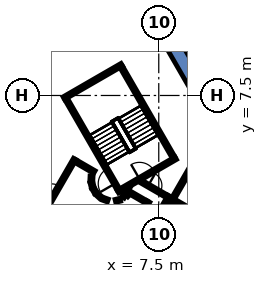
"""IFC4 building model, lengths in metres.
Left out: names, types, materials, properties, quantities, classifications, styles, units other than length and angle.
Written with IfcOpenShell. Run it as: python <this file> out.ifc"""

import sys

from ifc_helpers import new_model, si_unit, direction, frame, frame_2d, origin, place, context, subcontext, project, spatial, polyline, rectangle, outline, extrude, element, fill, save


model = new_model("IFC4")
c1 = context("Model", 3, precision=1e-05, world=origin(), true_north=direction((0.0, 1.0)))
c2 = subcontext(c1, "Body", "Model", "MODEL_VIEW")
j1 = project(units=[si_unit("LENGTHUNIT", "METRE"), si_unit("PLANEANGLEUNIT", "RADIAN")], contexts=[c1])
p1 = place(None, origin())
s1 = spatial("IfcSite", under=j1, at=p1, CompositionType="ELEMENT")
p2 = place(p1, origin())
s2 = spatial("IfcBuilding", under=s1, at=p2, CompositionType="ELEMENT")
p3 = place(p2, origin())
s3 = spatial("IfcBuildingStorey", under=s2, at=p3, CompositionType="ELEMENT", Elevation=0.0)
p4 = place(p3, frame((0.0, 0.0, -0.5)))
e1 = element("IfcWall", 1, at=p4, inside=s3, PredefinedType="SHEAR", context=c2, shape_type="SweptSolid", body=[
    extrude(outline(polyline([(8.517, 11.748), (7.651, 11.248), (12.702, 2.5), (13.856, 2.5), (8.517, 11.748)])), origin(), (0.0, 0.0, 1.0), 9.05),
])
p5 = place(p3, frame((5.39, 0.898, 0.0), z_axis=(0.0, 0.0, 1.0), x_axis=(0.673828488714, 0.738887791073, 0.0)))
e2 = element("IfcWall", 2, at=p5, inside=s3, PredefinedType="PARTITIONING", context=c2, shape_type="SweptSolid", body=[
    extrude(rectangle(XDim=0.263, YDim=0.2, at=frame_2d((0.131, 0.0))), origin(), (0.0, 0.0, 1.0), 8.55),
])
p6 = place(p3, frame((5.499, 1.172, 0.0), z_axis=(0.0, 0.0, 1.0), x_axis=(0.866333505267, -0.499465972466, 0.0)))
e3 = element("IfcWall", 3, at=p6, inside=s3, PredefinedType="PARTITIONING", context=c2, shape_type="SweptSolid", body=[
    extrude(rectangle(XDim=1.374, YDim=0.2, at=frame_2d((0.687, 0.0))), origin(), (0.0, 0.0, 1.0), 8.55),
])
p7 = place(p3, frame((6.826, 0.522, 0.0), z_axis=(0.0, 0.0, 1.0), x_axis=(-0.500016722714, -0.866015748706, 0.0)))
e4 = element("IfcWall", 4, at=p7, inside=s3, PredefinedType="PARTITIONING", context=c2, shape_type="SweptSolid", body=[
    extrude(rectangle(XDim=1.7, YDim=0.2, at=frame_2d((0.85, 0.0))), origin(), (0.0, 0.0, 1.0), 8.55),
])
p8 = place(p3, frame((8.192, 0.888, 0.0), z_axis=(0.0, 0.0, 1.0), x_axis=(-0.499940625693, -0.866059680843, 0.0)))
e5 = element("IfcWall", 5, at=p8, inside=s3, PredefinedType="PARTITIONING", context=c2, shape_type="SweptSolid", body=[
    extrude(rectangle(XDim=2.68, YDim=0.2, at=frame_2d((1.34, 0.0))), origin(), (0.0, 0.0, 1.0), 8.55),
])
p9 = place(p3, frame((5.135, 0.793, 0.0), z_axis=(0.0, 0.0, 1.0), x_axis=(0.499526442893, 0.866298639529, 0.0)))
e6 = element("IfcWall", 6, at=p9, inside=s3, PredefinedType="PARTITIONING", context=c2, shape_type="SweptSolid", body=[
    extrude(rectangle(XDim=0.791, YDim=0.2, at=frame_2d((0.396, 0.0))), origin(), (0.0, 0.0, 1.0), 8.55),
])
p10 = place(p3, frame((6.25, 1.894, 0.0), z_axis=(0.0, 0.0, 1.0), x_axis=(0.866043184279, -0.499969202016, 0.0)))
e7 = element("IfcWall", 7, at=p10, inside=s3, PredefinedType="PARTITIONING", context=c2, shape_type="SweptSolid", body=[
    extrude(rectangle(XDim=2.084, YDim=0.2, at=frame_2d((1.042, 0.0))), origin(), (0.0, 0.0, 1.0), 8.55),
])
p11 = place(p10, frame((0.642, 0.0, 0.0)))
e8 = element("IfcOpeningElement", 8, at=p11, cuts=e7, PredefinedType="OPENING", context=c2, shape_type="SweptSolid", body=[
    extrude(rectangle(XDim=0.9, YDim=2.1, at=frame_2d((0.45, 1.05))), frame((0.0, 0.11, 0.0), z_axis=(0.0, -1.0, 0.0), x_axis=(1.0, 0.0, 0.0)), (0.0, 0.0, 1.0), 0.22),
])
p12 = place(p3, frame((3.079, 2.199, 0.0), z_axis=(0.0, 0.0, 1.0), x_axis=(-0.047771483479, -0.998858290933, 0.0)))
e9 = element("IfcWall", 9, at=p12, inside=s3, PredefinedType="PARTITIONING", context=c2, shape_type="SweptSolid", body=[
    extrude(rectangle(XDim=0.337, YDim=0.2, at=frame_2d((0.169, 0.0))), origin(), (0.0, 0.0, 1.0), 8.55),
])
p13 = place(p3, frame((3.07, 1.786, 0.0), z_axis=(0.0, 0.0, 1.0), x_axis=(0.242705583207, -0.970099994784, 0.0)))
e10 = element("IfcWall", 10, at=p13, inside=s3, PredefinedType="PARTITIONING", context=c2, shape_type="SweptSolid", body=[
    extrude(rectangle(XDim=0.338, YDim=0.2, at=frame_2d((0.169, 0.0))), origin(), (0.0, 0.0, 1.0), 8.55),
])
for number, where, z_axis, x_axis in (
    (11, (3.182, 1.388, 0.0), (0.0, 0.0, 1.0), (0.512, -0.859, 0.0)),
    (12, (3.404, 1.039, 0.0), (0.0, 0.0, 1.0), (0.74, -0.672, 0.0)),
):
    element("IfcWall", number, at=place(p3, frame(where, z_axis=z_axis, x_axis=x_axis)), inside=s3, PredefinedType="PARTITIONING", context=c2, shape_type="SweptSolid", body=[
        extrude(rectangle(XDim=0.338, YDim=0.2, at=frame_2d((0.169, 0.0))), origin(), (0.0, 0.0, 1.0), 8.55),
    ])
p14 = place(p3, frame((3.838, 0.702, 0.0), z_axis=(0.0, 0.0, 1.0), x_axis=(0.941035081519, -0.338308993895, 0.0)))
e13 = element("IfcWall", 13, at=p14, inside=s3, PredefinedType="PARTITIONING", context=c2, shape_type="SweptSolid", body=[
    extrude(rectangle(XDim=0.337, YDim=0.2, at=frame_2d((0.168, 0.0))), origin(), (0.0, 0.0, 1.0), 8.55),
])
p15 = place(p3, frame((4.644, 0.564, 0.0), z_axis=(0.0, 0.0, 1.0), x_axis=(0.969929076366, 0.243387729394, 0.0)))
e14 = element("IfcWall", 14, at=p15, inside=s3, PredefinedType="PARTITIONING", context=c2, shape_type="SweptSolid", body=[
    extrude(rectangle(XDim=0.337, YDim=0.2, at=frame_2d((0.168, 0.0))), origin(), (0.0, 0.0, 1.0), 8.55),
])
p16 = place(p3, frame((-0.52, -1.0, 0.0), z_axis=(0.0, 0.0, 1.0), x_axis=(0.50011622646, 0.865958290007, 0.0)))
e15 = element("IfcWall", 15, at=p16, inside=s3, PredefinedType="PARTITIONING", context=c2, shape_type="SweptSolid", body=[
    extrude(rectangle(XDim=4.991, YDim=0.2, at=frame_2d((2.496, 0.0))), origin(), (0.0, 0.0, 1.0), 8.55),
])
p17 = place(p16, frame((1.945, 0.0, 0.0)))
e16 = element("IfcOpeningElement", 16, at=p17, cuts=e15, PredefinedType="OPENING", context=c2, shape_type="SweptSolid", body=[
    extrude(rectangle(XDim=1.0, YDim=2.1, at=frame_2d((0.5, 1.05))), frame((0.0, 0.11, 0.0), z_axis=(0.0, -1.0, 0.0), x_axis=(1.0, 0.0, 0.0)), (0.0, 0.0, 1.0), 0.22),
])
p18 = place(p3, frame((2.012, 3.186, 0.0), z_axis=(0.0, 0.0, 1.0), x_axis=(0.865891012941, -0.500232699559, 0.0)))
e17 = element("IfcWall", 17, at=p18, inside=s3, PredefinedType="PARTITIONING", context=c2, shape_type="SweptSolid", body=[
    extrude(rectangle(XDim=1.449, YDim=0.2, at=frame_2d((0.725, 0.0))), origin(), (0.0, 0.0, 1.0), 8.55),
])
p19 = place(p3, frame((4.451, -6.19, 0.0), z_axis=(0.0, 0.0, 1.0), x_axis=(0.50000090737, 0.866024879913, 0.0)))
e18 = element("IfcWall", 18, at=p19, inside=s3, PredefinedType="STANDARD", context=c2, shape_type="SweptSolid", body=[
    extrude(rectangle(XDim=10.6, YDim=0.2, at=frame_2d((5.3, 0.0))), origin(), (0.0, 0.0, 1.0), 8.55),
])
p20 = place(p3, frame((8.488, 0.602, 0.0), z_axis=(0.0, 0.0, 1.0), x_axis=(0.866022959057, -0.500004234368, 0.0)))
e19 = element("IfcWall", 19, at=p20, inside=s3, PredefinedType="STANDARD", context=c2, shape_type="SweptSolid", body=[
    extrude(rectangle(XDim=2.5, YDim=0.2, at=frame_2d((1.25, 0.0))), origin(), (0.0, 0.0, 1.0), 8.55),
])
p21 = place(p3, frame((4.806, 1.176, 0.0), z_axis=(0.0, 0.0, 1.0), x_axis=(0.866059941101, 0.499940174841, 0.0)))
e20 = element("IfcWall", 20, at=p21, inside=s3, PredefinedType="STANDARD", context=c2, shape_type="SweptSolid", body=[
    extrude(rectangle(XDim=4.4, YDim=0.2, at=frame_2d((2.2, 0.0))), origin(), (0.0, 0.0, 1.0), 8.55),
])
p22 = place(p21, frame((1.65, 0.0, 0.0)))
e21 = element("IfcOpeningElement", 21, at=p22, cuts=e20, PredefinedType="OPENING", context=c2, shape_type="SweptSolid", body=[
    extrude(rectangle(XDim=1.1, YDim=2.2, at=frame_2d((0.55, 1.1))), frame((0.0, 0.11, 0.0), z_axis=(0.0, -1.0, 0.0), x_axis=(1.0, 0.0, 0.0)), (0.0, 0.0, 1.0), 0.22),
])
p23 = place(p3, frame((1.256, 7.324, 0.0), z_axis=(0.0, 0.0, 1.0), x_axis=(0.866046073146, 0.499964197906, 0.0)))
e22 = element("IfcWall", 22, at=p23, inside=s3, PredefinedType="STANDARD", context=c2, shape_type="SweptSolid", body=[
    extrude(rectangle(XDim=4.4, YDim=0.2, at=frame_2d((2.2, 0.0))), origin(), (0.0, 0.0, 1.0), 8.55),
])
p24 = place(p3, frame((4.843, 1.312, 0.0), z_axis=(0.0, 0.0, 1.0), x_axis=(-0.499963383562, 0.866046543262, 0.0)))
e23 = element("IfcWall", 23, at=p24, inside=s3, PredefinedType="STANDARD", context=c2, shape_type="SweptSolid", body=[
    extrude(rectangle(XDim=6.9, YDim=0.2, at=frame_2d((3.45, 0.0))), origin(), (0.0, 0.0, 1.0), 8.55),
])
p25 = place(p24, frame((0.45, 0.0, 0.0)))
e24 = element("IfcOpeningElement", 24, at=p25, cuts=e23, PredefinedType="OPENING", context=c2, shape_type="SweptSolid", body=[
    extrude(rectangle(XDim=1.1, YDim=2.2, at=frame_2d((0.55, 1.1))), frame((0.0, 0.11, 0.0), z_axis=(0.0, -1.0, 0.0), x_axis=(1.0, 0.0, 0.0)), (0.0, 0.0, 1.0), 0.22),
])
p26 = place(p3, frame((8.48, 3.412, 0.0), z_axis=(0.0, 0.0, 1.0), x_axis=(-0.499978703459, 0.866037698999, 0.0)))
e25 = element("IfcWall", 25, at=p26, inside=s3, PredefinedType="STANDARD", context=c2, shape_type="SweptSolid", body=[
    extrude(rectangle(XDim=6.9, YDim=0.2, at=frame_2d((3.45, 0.0))), origin(), (0.0, 0.0, 1.0), 8.55),
])
p27 = place(p17, origin())
e26 = element("IfcDoor", 26, at=p27, inside=s3, OperationType="SINGLE_SWING_LEFT", PredefinedType="DOOR", context=c2, shape_type="SweptSolid", body=[
    extrude(rectangle(XDim=1.0, YDim=2.1, at=frame_2d((0.5, 1.05))), frame((0.0, 0.025, 0.0), z_axis=(0.0, -1.0, 0.0), x_axis=(1.0, 0.0, 0.0)), (0.0, 0.0, 1.0), 0.05),
])
fill(e16, e26)
p28 = place(p11, origin())
e27 = element("IfcDoor", 27, at=p28, inside=s3, OperationType="SINGLE_SWING_LEFT", PredefinedType="DOOR", context=c2, shape_type="SweptSolid", body=[
    extrude(rectangle(XDim=0.9, YDim=2.1, at=frame_2d((0.45, 1.05))), frame((0.0, 0.025, 0.0), z_axis=(0.0, -1.0, 0.0), x_axis=(1.0, 0.0, 0.0)), (0.0, 0.0, 1.0), 0.05),
])
fill(e8, e27)
p29 = place(p25, origin())
e28 = element("IfcDoor", 28, at=p29, inside=s3, OperationType="SINGLE_SWING_LEFT", PredefinedType="DOOR", context=c2, shape_type="SweptSolid", body=[
    extrude(rectangle(XDim=1.1, YDim=2.2, at=frame_2d((0.55, 1.1))), frame((0.0, 0.025, 0.0), z_axis=(0.0, -1.0, 0.0), x_axis=(1.0, 0.0, 0.0)), (0.0, 0.0, 1.0), 0.05),
])
fill(e24, e28)
p30 = place(p22, origin())
e29 = element("IfcDoor", 29, at=p30, inside=s3, OperationType="SINGLE_SWING_LEFT", PredefinedType="DOOR", context=c2, shape_type="SweptSolid", body=[
    extrude(rectangle(XDim=1.1, YDim=2.2, at=frame_2d((0.55, 1.1))), frame((0.0, 0.025, 0.0), z_axis=(0.0, -1.0, 0.0), x_axis=(1.0, 0.0, 0.0)), (0.0, 0.0, 1.0), 0.05),
])
fill(e21, e29)
save(model, sys.argv[1])
